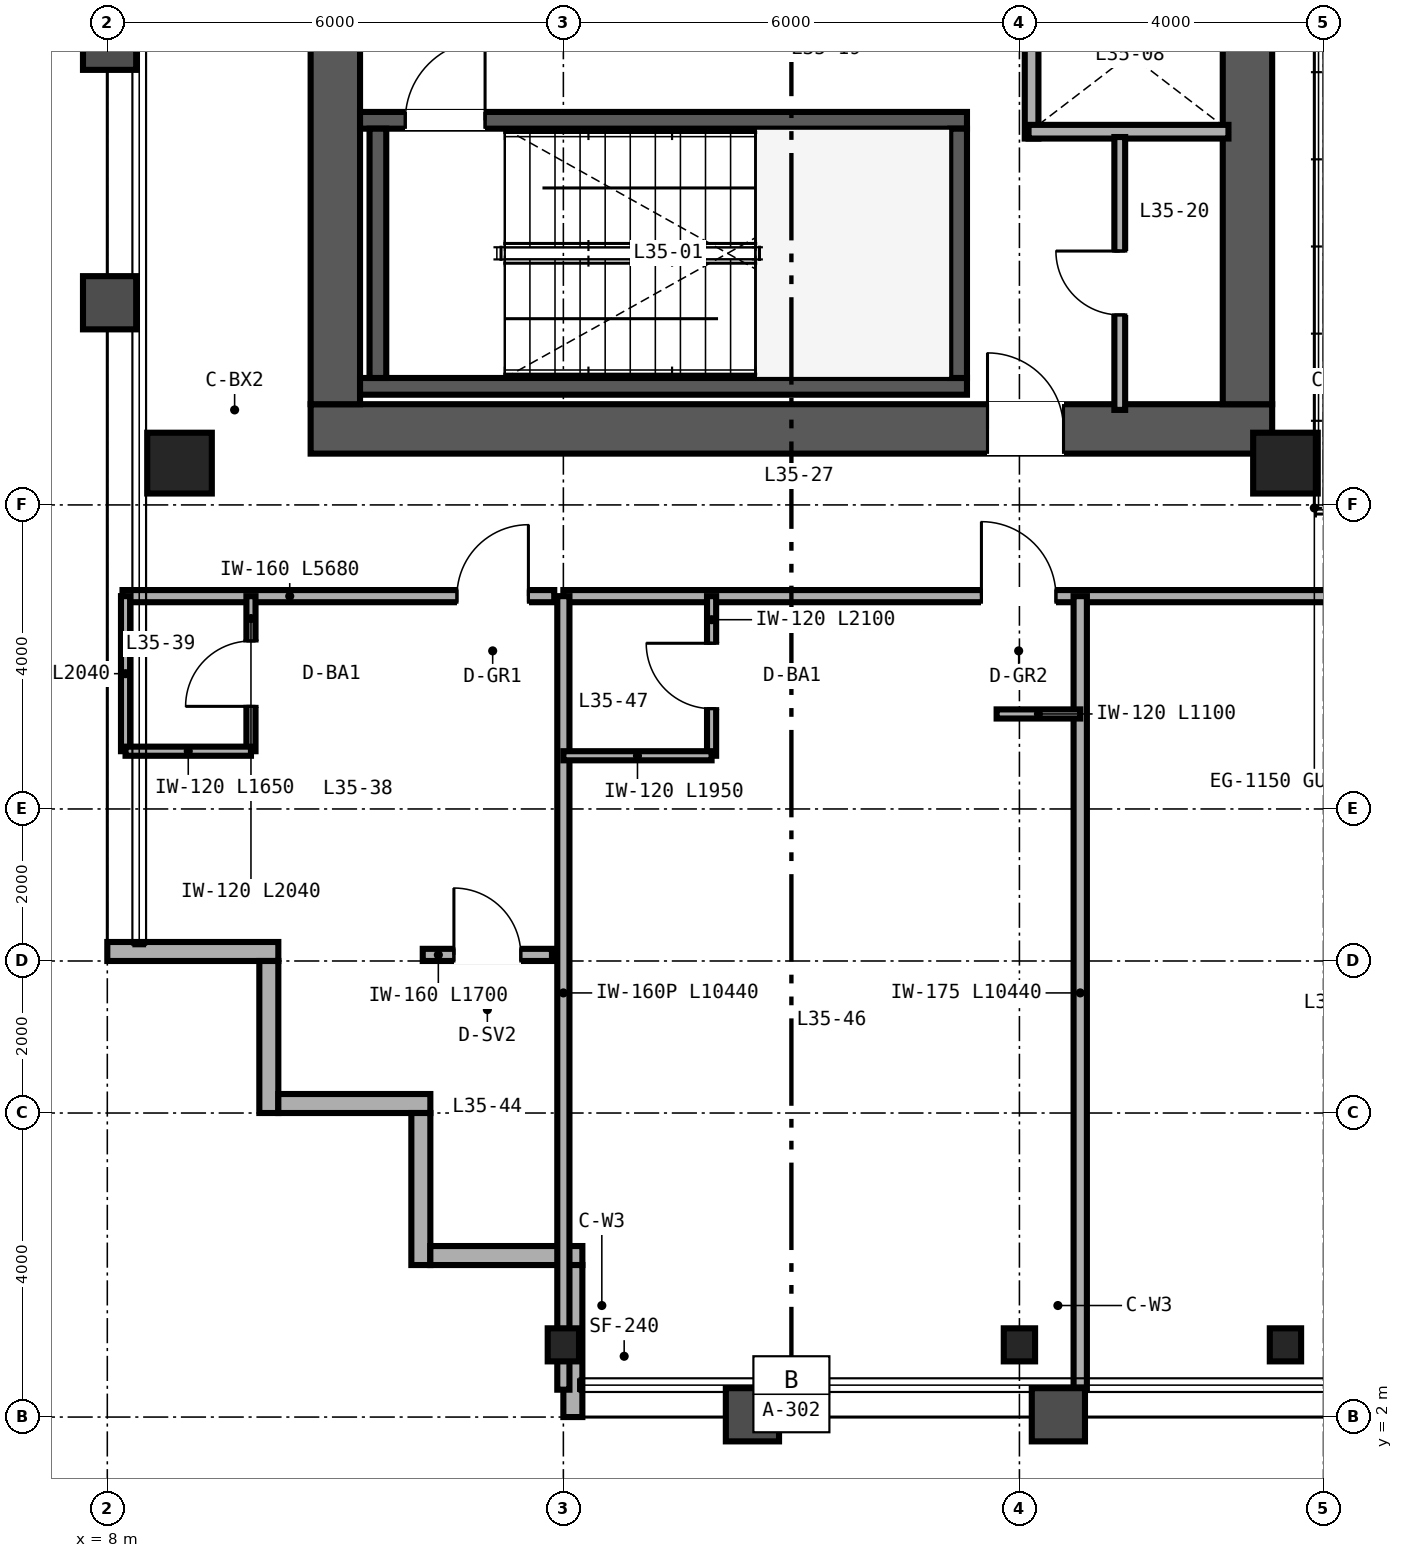
"""IFC4 building model, lengths in metres.
Left out: names, types, materials, properties, quantities, classifications, styles, units other than length and angle.
Written with IfcOpenShell. Run it as: python <this file> out.ifc"""

import sys

from ifc_helpers import new_model, si_unit, direction, frame, frame_2d, origin, origin_2d, place, context, subcontext, project, spatial, rectangle, hollow_rectangle, i_section, extrude, source, transform, mapped, element, fill, save


model = new_model("IFC4")
c1 = context("Model", 3, precision=1e-05, world=origin(), true_north=direction((0.0, 1.0)))
c2 = subcontext(c1, "Body", "Model", "MODEL_VIEW")
j1 = project(units=[si_unit("LENGTHUNIT", "METRE"), si_unit("PLANEANGLEUNIT", "RADIAN")], contexts=[c1])
p1 = place(None, origin())
s1 = spatial("IfcSite", under=j1, at=p1, CompositionType="ELEMENT")
p2 = place(p1, origin())
s2 = spatial("IfcBuilding", under=s1, at=p2, CompositionType="ELEMENT")
p3 = place(p2, frame((0.0, 0.0, 140.4)))
s3 = spatial("IfcBuildingStorey", under=s2, at=p3, CompositionType="ELEMENT", Elevation=140.4)
p4 = place(p3, frame((10.675, 15.0, 0.0), z_axis=(0.0, 0.0, 1.0), x_axis=(1.0, 0.0, 0.0)))
e1 = element("IfcWall", 1, at=p4, inside=s3, PredefinedType="SHEAR", context=c2, shape_type="SweptSolid", body=[
    extrude(rectangle(XDim=12.65, YDim=0.65, at=frame_2d((6.325, 0.0))), origin(), (0.0, 0.0, 1.0), 3.36),
])
p5 = place(p4, frame((8.905, 0.0, 0.0)))
e2 = element("IfcOpeningElement", 2, at=p5, cuts=e1, PredefinedType="OPENING", context=c2, shape_type="SweptSolid", body=[
    extrude(rectangle(XDim=1.0, YDim=2.15, at=frame_2d((0.5, 1.075))), frame((0.0, 0.335, 0.0), z_axis=(0.0, -1.0, 0.0), x_axis=(1.0, 0.0, 0.0)), (0.0, 0.0, 1.0), 0.67),
])
for number, where, z_axis, x_axis in (
    (3, (11.0, 15.325, 0.0), (0.0, 0.0, 1.0), (0.0, 1.0, 0.0)),
    (4, (23.0, 15.325, 0.0), (0.0, 0.0, 1.0), (0.0, 1.0, 0.0)),
):
    element("IfcWall", number, at=place(p3, frame(where, z_axis=z_axis, x_axis=x_axis)), inside=s3, PredefinedType="SHEAR", context=c2, shape_type="SweptSolid", body=[
        extrude(rectangle(XDim=21.35, YDim=0.65, at=frame_2d((10.675, 0.0))), origin(), (0.0, 0.0, 1.0), 3.36),
    ])
p6 = place(p3, frame((11.325, 15.56, 0.0), z_axis=(0.0, 0.0, 1.0), x_axis=(1.0, 0.0, 0.0)))
e5 = element("IfcWall", 5, at=p6, inside=s3, PredefinedType="SHEAR", context=c2, shape_type="SweptSolid", body=[
    extrude(rectangle(XDim=7.985, YDim=0.22, at=frame_2d((3.993, 0.0))), origin(), (0.0, 0.0, 1.0), 3.4),
])
p7 = place(p3, frame((11.325, 19.06, 0.0), z_axis=(0.0, 0.0, 1.0), x_axis=(1.0, 0.0, 0.0)))
e6 = element("IfcWall", 6, at=p7, inside=s3, PredefinedType="SHEAR", context=c2, shape_type="SweptSolid", body=[
    extrude(rectangle(XDim=7.985, YDim=0.22, at=frame_2d((3.993, 0.0))), origin(), (0.0, 0.0, 1.0), 3.4),
])
p8 = place(p7, frame((0.595, 0.0, 0.0)))
e7 = element("IfcOpeningElement", 7, at=p8, cuts=e6, PredefinedType="OPENING", context=c2, shape_type="SweptSolid", body=[
    extrude(rectangle(XDim=1.05, YDim=2.15, at=frame_2d((0.525, 1.075))), frame((0.0, 0.12, 0.0), z_axis=(0.0, -1.0, 0.0), x_axis=(1.0, 0.0, 0.0)), (0.0, 0.0, 1.0), 0.24),
])
for number, where, z_axis, x_axis in (
    (8, (11.56, 15.67, 0.0), (0.0, 0.0, 1.0), (0.0, 1.0, 0.0)),
    (9, (19.2, 15.67, 0.0), (0.0, 0.0, 1.0), (0.0, 1.0, 0.0)),
):
    element("IfcWall", number, at=place(p3, frame(where, z_axis=z_axis, x_axis=x_axis)), inside=s3, PredefinedType="SHEAR", context=c2, shape_type="SweptSolid", body=[
        extrude(rectangle(XDim=3.28, YDim=0.22, at=frame_2d((1.64, 0.0))), origin(), (0.0, 0.0, 1.0), 3.4),
    ])
m1 = source(origin(), c2, "Body", "SweptSolid", [
    extrude(hollow_rectangle(XDim=0.85, YDim=0.8, WallThickness=0.032, at=origin_2d()), origin(), (0.0, 0.0, 1.0), 3.36),
])
for number, where, z_axis, x_axis in (
    (10, (8.95, 14.55, 0.0), (0.0, 0.0, 1.0), (1.0, 0.0, 0.0)),
    (11, (23.5, 14.55, 0.0), (0.0, 0.0, 1.0), (1.0, 0.0, 0.0)),
):
    element("IfcColumn", number, at=place(p3, frame(where, z_axis=z_axis, x_axis=x_axis)), inside=s3, PredefinedType="COLUMN", context=c2, shape_type="MappedRepresentation", body=[
        mapped(m1, transform((0.0, 0.0, 0.0), scale=1.0)),
    ])
m2 = source(origin(), c2, "Body", "SweptSolid", [
    extrude(i_section(OverallWidth=0.412, OverallDepth=0.435, WebThickness=0.036, FlangeThickness=0.057, FilletRadius=0.025, at=origin_2d()), origin(), (0.0, 0.0, 1.0), 3.36),
])
for number, where, z_axis, x_axis in (
    (12, (14.0, 2.95, 0.0), (0.0, 0.0, 1.0), (1.0, 0.0, 0.0)),
    (13, (20.0, 2.95, 0.0), (0.0, 0.0, 1.0), (1.0, 0.0, 0.0)),
    (14, (23.5, 2.95, 0.0), (0.0, 0.0, 1.0), (1.0, 0.0, 0.0)),
):
    element("IfcColumn", number, at=place(p3, frame(where, z_axis=z_axis, x_axis=x_axis)), inside=s3, PredefinedType="COLUMN", context=c2, shape_type="MappedRepresentation", body=[
        mapped(m2, transform((0.0, 0.0, 0.0), scale=1.0)),
    ])
p9 = place(p3, frame((8.0, 8.125, 0.0), z_axis=(0.0, 0.0, 1.0), x_axis=(1.0, 0.0, 0.0)))
e15 = element("IfcWall", 15, at=p9, inside=s3, PredefinedType="SOLIDWALL", context=c2, shape_type="SweptSolid", body=[
    extrude(rectangle(XDim=2.25, YDim=0.25, at=frame_2d((1.125, 0.0))), origin(), (0.0, 0.0, 1.0), 3.36),
])
for number, where, z_axis, x_axis in (
    (16, (10.125, 8.0, 0.0), (0.0, 0.0, 1.0), (0.0, -1.0, 0.0)),
    (17, (10.25, 6.125, 0.0), (0.0, 0.0, 1.0), (1.0, 0.0, 0.0)),
    (18, (12.125, 6.0, 0.0), (0.0, 0.0, 1.0), (0.0, -1.0, 0.0)),
    (19, (12.25, 4.125, 0.0), (0.0, 0.0, 1.0), (1.0, 0.0, 0.0)),
):
    element("IfcWall", number, at=place(p3, frame(where, z_axis=z_axis, x_axis=x_axis)), inside=s3, PredefinedType="SOLIDWALL", context=c2, shape_type="SweptSolid", body=[
        extrude(rectangle(XDim=2.0, YDim=0.25, at=frame_2d((1.0, 0.0))), origin(), (0.0, 0.0, 1.0), 3.36),
    ])
p10 = place(p3, frame((14.125, 4.0, 0.0), z_axis=(0.0, 0.0, 1.0), x_axis=(0.0, -1.0, 0.0)))
e20 = element("IfcWall", 20, at=p10, inside=s3, PredefinedType="SOLIDWALL", context=c2, shape_type="SweptSolid", body=[
    extrude(rectangle(XDim=2.0, YDim=0.25, at=frame_2d((1.0, 0.0))), origin(), (0.0, 0.0, 1.0), 2.667),
])
p11 = place(p3, frame((20.16, 18.82, 0.0), z_axis=(0.0, 0.0, 1.0), x_axis=(0.0, 1.0, 0.0)))
e21 = element("IfcWall", 21, at=p11, inside=s3, PredefinedType="SOLIDWALL", context=c2, shape_type="SweptSolid", body=[
    extrude(rectangle(XDim=6.32, YDim=0.18, at=frame_2d((3.16, 0.0))), origin(), (0.0, 0.0, 1.0), 2.36),
])
p12 = place(p3, frame((20.12, 18.91, 0.0), z_axis=(0.0, 0.0, 1.0), x_axis=(1.0, 0.0, 0.0)))
e22 = element("IfcWall", 22, at=p12, inside=s3, PredefinedType="SOLIDWALL", context=c2, shape_type="SweptSolid", body=[
    extrude(rectangle(XDim=2.63, YDim=0.18, at=frame_2d((1.315, 0.0))), origin(), (0.0, 0.0, 1.0), 3.36),
])
p13 = place(p3, frame((21.32, 15.25, 0.0), z_axis=(0.0, 0.0, 1.0), x_axis=(0.0, 1.0, 0.0)))
e23 = element("IfcWall", 23, at=p13, inside=s3, PredefinedType="PARTITIONING", context=c2, shape_type="SweptSolid", body=[
    extrude(rectangle(XDim=3.59, YDim=0.142, at=frame_2d((1.795, 0.0))), origin(), (0.0, 0.0, 1.0), 3.36),
])
p14 = place(p13, frame((1.25, 0.0, 0.0)))
e24 = element("IfcOpeningElement", 24, at=p14, cuts=e23, PredefinedType="OPENING", context=c2, shape_type="SweptSolid", body=[
    extrude(rectangle(XDim=0.84, YDim=2.1, at=frame_2d((0.42, 1.05))), frame((0.0, 0.081, 0.0), z_axis=(0.0, -1.0, 0.0), x_axis=(1.0, 0.0, 0.0)), (0.0, 0.0, 1.0), 0.162),
])
p15 = place(p3, frame((8.2, 12.8, 0.0), z_axis=(0.0, 0.0, 1.0), x_axis=(1.0, 0.0, 0.0)))
e25 = element("IfcWall", 25, at=p15, inside=s3, PredefinedType="PARTITIONING", context=c2, shape_type="SweptSolid", body=[
    extrude(rectangle(XDim=5.68, YDim=0.16, at=frame_2d((2.84, 0.0))), origin(), (0.0, 0.0, 1.0), 3.36),
])
p16 = place(p15, frame((4.4, 0.0, 0.0)))
e26 = element("IfcOpeningElement", 26, at=p16, cuts=e25, PredefinedType="OPENING", context=c2, shape_type="SweptSolid", body=[
    extrude(rectangle(XDim=0.94, YDim=2.15, at=frame_2d((0.47, 1.075))), frame((0.0, 0.09, 0.0), z_axis=(0.0, -1.0, 0.0), x_axis=(1.0, 0.0, 0.0)), (0.0, 0.0, 1.0), 0.18),
])
p17 = place(p3, frame((9.89, 10.76, 0.0), z_axis=(0.0, 0.0, 1.0), x_axis=(0.0, 1.0, 0.0)))
e27 = element("IfcWall", 27, at=p17, inside=s3, PredefinedType="PARTITIONING", context=c2, shape_type="SweptSolid", body=[
    extrude(rectangle(XDim=2.04, YDim=0.12, at=frame_2d((1.02, 0.0))), origin(), (0.0, 0.0, 1.0), 3.36),
])
p18 = place(p17, frame((0.59, 0.0, 0.0)))
e28 = element("IfcOpeningElement", 28, at=p18, cuts=e27, PredefinedType="OPENING", context=c2, shape_type="SweptSolid", body=[
    extrude(rectangle(XDim=0.86, YDim=2.1, at=frame_2d((0.43, 1.05))), frame((0.0, 0.07, 0.0), z_axis=(0.0, -1.0, 0.0), x_axis=(1.0, 0.0, 0.0)), (0.0, 0.0, 1.0), 0.14),
])
p19 = place(p3, frame((8.24, 10.76, 0.0), z_axis=(0.0, 0.0, 1.0), x_axis=(0.0, 1.0, 0.0)))
e29 = element("IfcWall", 29, at=p19, inside=s3, PredefinedType="PARTITIONING", context=c2, shape_type="SweptSolid", body=[
    extrude(rectangle(XDim=2.04, YDim=0.12, at=frame_2d((1.02, 0.0))), origin(), (0.0, 0.0, 1.0), 3.36),
])
p20 = place(p3, frame((8.24, 10.76, 0.0), z_axis=(0.0, 0.0, 1.0), x_axis=(1.0, 0.0, 0.0)))
e30 = element("IfcWall", 30, at=p20, inside=s3, PredefinedType="PARTITIONING", context=c2, shape_type="SweptSolid", body=[
    extrude(rectangle(XDim=1.65, YDim=0.12, at=frame_2d((0.825, 0.0))), origin(), (0.0, 0.0, 1.0), 3.36),
])
p21 = place(p3, frame((12.15, 8.08, 0.0), z_axis=(0.0, 0.0, 1.0), x_axis=(1.0, 0.0, 0.0)))
e31 = element("IfcWall", 31, at=p21, inside=s3, PredefinedType="PARTITIONING", context=c2, shape_type="SweptSolid", body=[
    extrude(rectangle(XDim=1.7, YDim=0.16, at=frame_2d((0.85, 0.0))), origin(), (0.0, 0.0, 1.0), 3.36),
])
p22 = place(p21, frame((0.41, 0.0, 0.0)))
e32 = element("IfcOpeningElement", 32, at=p22, cuts=e31, PredefinedType="OPENING", context=c2, shape_type="SweptSolid", body=[
    extrude(rectangle(XDim=0.88, YDim=2.15, at=frame_2d((0.44, 1.075))), frame((0.0, 0.09, 0.0), z_axis=(0.0, -1.0, 0.0), x_axis=(1.0, 0.0, 0.0)), (0.0, 0.0, 1.0), 0.18),
])
p23 = place(p3, frame((14.0, 12.8, 0.0), z_axis=(0.0, 0.0, 1.0), x_axis=(1.0, 0.0, 0.0)))
e33 = element("IfcWall", 33, at=p23, inside=s3, PredefinedType="PARTITIONING", context=c2, shape_type="SweptSolid", body=[
    extrude(rectangle(XDim=36.0, YDim=0.16, at=frame_2d((18.0, 0.0))), origin(), (0.0, 0.0, 1.0), 2.581),
])
p24 = place(p23, frame((5.5, 0.0, 0.0)))
e34 = element("IfcOpeningElement", 34, at=p24, cuts=e33, PredefinedType="OPENING", context=c2, shape_type="SweptSolid", body=[
    extrude(rectangle(XDim=0.98, YDim=2.2, at=frame_2d((0.49, 1.1))), frame((0.0, 0.09, 0.0), z_axis=(0.0, -1.0, 0.0), x_axis=(1.0, 0.0, 0.0)), (0.0, 0.0, 1.0), 0.18),
])
p25 = place(p23, frame((10.2, 0.0, 0.0)))
e35 = element("IfcOpeningElement", 35, at=p25, cuts=e33, PredefinedType="OPENING", context=c2, shape_type="SweptSolid", body=[
    extrude(rectangle(XDim=0.96, YDim=2.15, at=frame_2d((0.48, 1.075))), frame((0.0, 0.09, 0.0), z_axis=(0.0, -1.0, 0.0), x_axis=(1.0, 0.0, 0.0)), (0.0, 0.0, 1.0), 0.18),
])
p26 = place(p23, frame((16.72, 0.0, 0.0)))
e36 = element("IfcOpeningElement", 36, at=p26, cuts=e33, PredefinedType="OPENING", context=c2, shape_type="SweptSolid", body=[
    extrude(rectangle(XDim=0.96, YDim=2.15, at=frame_2d((0.48, 1.075))), frame((0.0, 0.09, 0.0), z_axis=(0.0, -1.0, 0.0), x_axis=(1.0, 0.0, 0.0)), (0.0, 0.0, 1.0), 0.18),
])
p27 = place(p23, frame((27.14, 0.0, 0.0)))
e37 = element("IfcOpeningElement", 37, at=p27, cuts=e33, PredefinedType="OPENING", context=c2, shape_type="SweptSolid", body=[
    extrude(rectangle(XDim=0.94, YDim=2.15, at=frame_2d((0.47, 1.075))), frame((0.0, 0.09, 0.0), z_axis=(0.0, -1.0, 0.0), x_axis=(1.0, 0.0, 0.0)), (0.0, 0.0, 1.0), 0.18),
])
p28 = place(p23, frame((34.74, 0.0, 0.0)))
e38 = element("IfcOpeningElement", 38, at=p28, cuts=e33, PredefinedType="OPENING", context=c2, shape_type="SweptSolid", body=[
    extrude(rectangle(XDim=0.94, YDim=2.15, at=frame_2d((0.47, 1.075))), frame((0.0, 0.09, 0.0), z_axis=(0.0, -1.0, 0.0), x_axis=(1.0, 0.0, 0.0)), (0.0, 0.0, 1.0), 0.18),
])
p29 = place(p3, frame((14.0, 2.36, 0.0), z_axis=(0.0, 0.0, 1.0), x_axis=(0.0, 1.0, 0.0)))
e39 = element("IfcWall", 39, at=p29, inside=s3, PredefinedType="PARTITIONING", context=c2, shape_type="SweptSolid", body=[
    extrude(rectangle(XDim=10.44, YDim=0.16, at=frame_2d((5.22, 0.0))), origin(), (0.0, 0.0, 1.0), 2.667),
])
p30 = place(p3, frame((20.8, 2.36, 0.0), z_axis=(0.0, 0.0, 1.0), x_axis=(0.0, 1.0, 0.0)))
e40 = element("IfcWall", 40, at=p30, inside=s3, PredefinedType="PARTITIONING", context=c2, shape_type="SweptSolid", body=[
    extrude(rectangle(XDim=10.44, YDim=0.175, at=frame_2d((5.22, 0.0))), origin(), (0.0, 0.0, 1.0), 2.823),
])
p31 = place(p3, frame((15.95, 10.7, 0.0), z_axis=(0.0, 0.0, 1.0), x_axis=(0.0, 1.0, 0.0)))
e41 = element("IfcWall", 41, at=p31, inside=s3, PredefinedType="PARTITIONING", context=c2, shape_type="SweptSolid", body=[
    extrude(rectangle(XDim=2.1, YDim=0.12, at=frame_2d((1.05, 0.0))), origin(), (0.0, 0.0, 1.0), 3.36),
])
p32 = place(p31, frame((0.62, 0.0, 0.0)))
e42 = element("IfcOpeningElement", 42, at=p32, cuts=e41, PredefinedType="OPENING", context=c2, shape_type="SweptSolid", body=[
    extrude(rectangle(XDim=0.86, YDim=2.1, at=frame_2d((0.43, 1.05))), frame((0.0, 0.07, 0.0), z_axis=(0.0, -1.0, 0.0), x_axis=(1.0, 0.0, 0.0)), (0.0, 0.0, 1.0), 0.14),
])
p33 = place(p3, frame((14.0, 10.7, 0.0), z_axis=(0.0, 0.0, 1.0), x_axis=(1.0, 0.0, 0.0)))
e43 = element("IfcWall", 43, at=p33, inside=s3, PredefinedType="PARTITIONING", context=c2, shape_type="SweptSolid", body=[
    extrude(rectangle(XDim=1.95, YDim=0.12, at=frame_2d((0.975, 0.0))), origin(), (0.0, 0.0, 1.0), 3.36),
])
p34 = place(p3, frame((19.7, 11.25, 0.0), z_axis=(0.0, 0.0, 1.0), x_axis=(1.0, 0.0, 0.0)))
e44 = element("IfcWall", 44, at=p34, inside=s3, PredefinedType="PARTITIONING", context=c2, shape_type="SweptSolid", body=[
    extrude(rectangle(XDim=1.1, YDim=0.12, at=frame_2d((0.55, 0.0))), origin(), (0.0, 0.0, 1.0), 3.36),
])
m3 = source(origin(), c2, "Body", "SweptSolid", [
    extrude(rectangle(XDim=1.05, YDim=2.15, at=frame_2d((0.525, 1.075))), frame((0.0, 0.025, 0.0), z_axis=(0.0, -1.0, 0.0), x_axis=(1.0, 0.0, 0.0)), (0.0, 0.0, 1.0), 0.05),
])
p35 = place(p8, origin())
e45 = element("IfcDoor", 45, at=p35, inside=s3, OperationType="SINGLE_SWING_RIGHT", PredefinedType="DOOR", context=c2, shape_type="MappedRepresentation", body=[
    mapped(m3, transform((0.0, 0.0, 0.0), scale=1.0)),
])
fill(e7, e45)
m4 = source(origin(), c2, "Body", "SweptSolid", [
    extrude(rectangle(XDim=0.84, YDim=2.1, at=frame_2d((0.42, 1.05))), frame((0.0, 0.025, 0.0), z_axis=(0.0, -1.0, 0.0), x_axis=(1.0, 0.0, 0.0)), (0.0, 0.0, 1.0), 0.05),
])
p36 = place(p14, origin())
e46 = element("IfcDoor", 46, at=p36, inside=s3, OperationType="SINGLE_SWING_RIGHT", PredefinedType="DOOR", context=c2, shape_type="MappedRepresentation", body=[
    mapped(m4, transform((0.0, 0.0, 0.0), scale=1.0)),
])
fill(e24, e46)
m5 = source(origin(), c2, "Body", "SweptSolid", [
    extrude(rectangle(XDim=1.0, YDim=2.15, at=frame_2d((0.5, 1.075))), frame((0.0, 0.025, 0.0), z_axis=(0.0, -1.0, 0.0), x_axis=(1.0, 0.0, 0.0)), (0.0, 0.0, 1.0), 0.05),
])
p37 = place(p5, origin())
e47 = element("IfcDoor", 47, at=p37, inside=s3, OperationType="SINGLE_SWING_LEFT", PredefinedType="DOOR", context=c2, shape_type="MappedRepresentation", body=[
    mapped(m5, transform((0.0, 0.0, 0.0), scale=1.0)),
])
fill(e2, e47)
m6 = source(origin(), c2, "Body", "SweptSolid", [
    extrude(rectangle(XDim=0.86, YDim=2.1, at=frame_2d((0.43, 1.05))), frame((0.0, 0.025, 0.0), z_axis=(0.0, -1.0, 0.0), x_axis=(1.0, 0.0, 0.0)), (0.0, 0.0, 1.0), 0.05),
])
p38 = place(p18, origin())
e48 = element("IfcDoor", 48, at=p38, inside=s3, OperationType="SINGLE_SWING_LEFT", PredefinedType="DOOR", context=c2, shape_type="MappedRepresentation", body=[
    mapped(m6, transform((0.0, 0.0, 0.0), scale=1.0)),
])
fill(e28, e48)
m7 = source(origin(), c2, "Body", "SweptSolid", [
    extrude(rectangle(XDim=0.94, YDim=2.15, at=frame_2d((0.47, 1.075))), frame((0.0, 0.025, 0.0), z_axis=(0.0, -1.0, 0.0), x_axis=(1.0, 0.0, 0.0)), (0.0, 0.0, 1.0), 0.05),
])
p39 = place(p16, origin())
e49 = element("IfcDoor", 49, at=p39, inside=s3, OperationType="SINGLE_SWING_RIGHT", PredefinedType="DOOR", context=c2, shape_type="MappedRepresentation", body=[
    mapped(m7, transform((0.0, 0.0, 0.0), scale=1.0)),
])
fill(e26, e49)
m8 = source(origin(), c2, "Body", "SweptSolid", [
    extrude(rectangle(XDim=0.88, YDim=2.15, at=frame_2d((0.44, 1.075))), frame((0.0, 0.025, 0.0), z_axis=(0.0, -1.0, 0.0), x_axis=(1.0, 0.0, 0.0)), (0.0, 0.0, 1.0), 0.05),
])
p40 = place(p22, origin())
e50 = element("IfcDoor", 50, at=p40, inside=s3, OperationType="SINGLE_SWING_LEFT", PredefinedType="DOOR", context=c2, shape_type="MappedRepresentation", body=[
    mapped(m8, transform((0.0, 0.0, 0.0), scale=1.0)),
])
fill(e32, e50)
p41 = place(p32, origin())
e51 = element("IfcDoor", 51, at=p41, inside=s3, OperationType="SINGLE_SWING_RIGHT", PredefinedType="DOOR", context=c2, shape_type="MappedRepresentation", body=[
    mapped(m6, transform((0.0, 0.0, 0.0), scale=1.0)),
])
fill(e42, e51)
m9 = source(origin(), c2, "Body", "SweptSolid", [
    extrude(rectangle(XDim=0.98, YDim=2.2, at=frame_2d((0.49, 1.1))), frame((0.0, 0.025, 0.0), z_axis=(0.0, -1.0, 0.0), x_axis=(1.0, 0.0, 0.0)), (0.0, 0.0, 1.0), 0.05),
])
p42 = place(p24, origin())
e52 = element("IfcDoor", 52, at=p42, inside=s3, OperationType="SINGLE_SWING_LEFT", PredefinedType="DOOR", context=c2, shape_type="MappedRepresentation", body=[
    mapped(m9, transform((0.0, 0.0, 0.0), scale=1.0)),
])
fill(e34, e52)
save(model, sys.argv[1])
